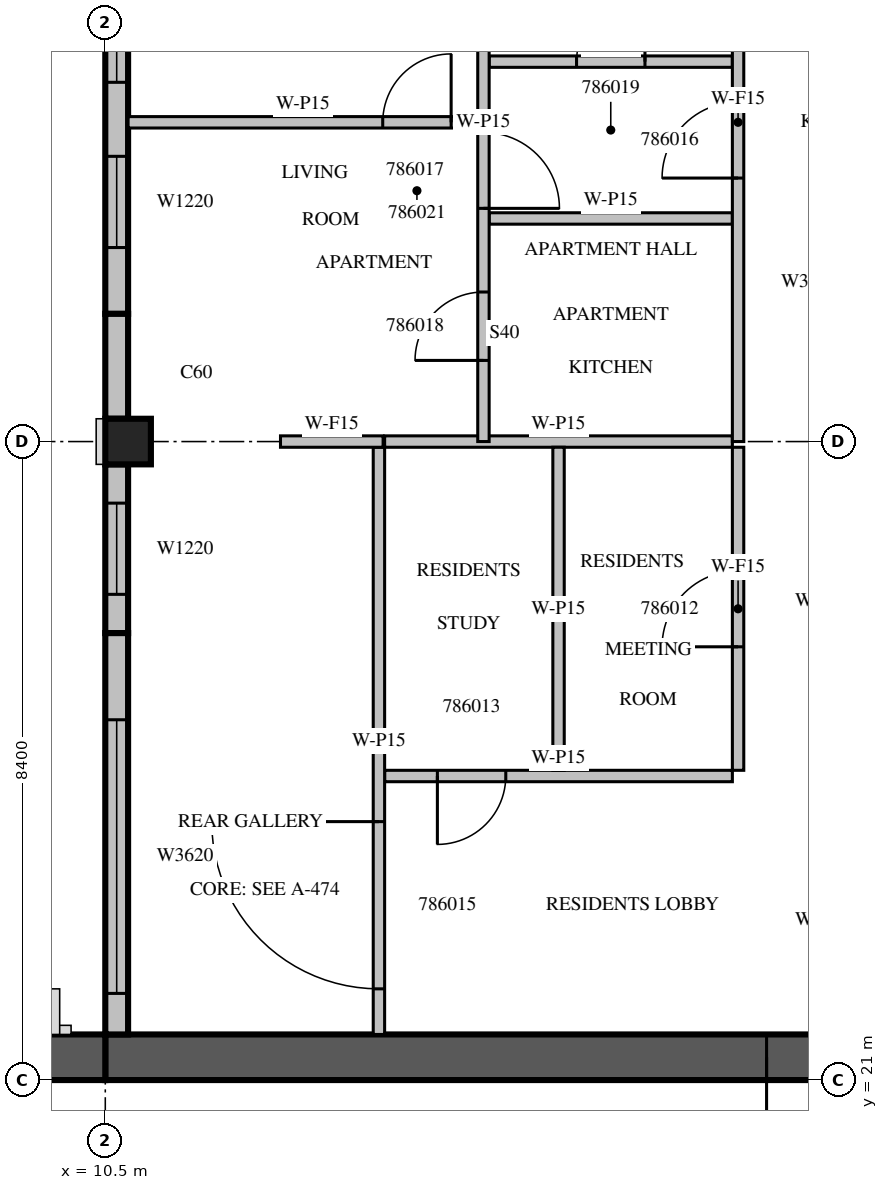
"""IFC4 building model, lengths in metres.
Left out: names, types, materials, properties, quantities, classifications, styles, units other than length and angle.
Written with IfcOpenShell. Run it as: python <this file> out.ifc"""

import sys

from ifc_helpers import new_model, si_unit, direction, frame, frame_2d, origin, origin_2d, place, context, subcontext, project, spatial, rectangle, extrude, source, transform, mapped, element, fill, save


model = new_model("IFC4")
c1 = context("Model", 3, precision=1e-05, world=origin(), true_north=direction((0.0, 1.0)))
c2 = subcontext(c1, "Body", "Model", "MODEL_VIEW")
j1 = project(units=[si_unit("LENGTHUNIT", "METRE"), si_unit("PLANEANGLEUNIT", "RADIAN")], contexts=[c1])
p1 = place(None, origin())
s1 = spatial("IfcSite", under=j1, at=p1, CompositionType="ELEMENT")
p2 = place(p1, origin())
s2 = spatial("IfcBuilding", under=s1, at=p2, CompositionType="ELEMENT")
p3 = place(p2, frame((0.0, 0.0, 361.5)))
s3 = spatial("IfcBuildingStorey", under=s2, at=p3, CompositionType="ELEMENT", Elevation=361.5)
m1 = source(origin(), c2, "Body", "SweptSolid", [
    extrude(rectangle(XDim=0.6, YDim=0.6, at=origin_2d()), origin(), (0.0, 0.0, 1.0), 3.5),
])
p4 = place(p3, frame((10.8, 29.4, 0.0), z_axis=(0.0, 0.0, 1.0), x_axis=(1.0, 0.0, 0.0)))
e1 = element("IfcColumn", 1, at=p4, inside=s3, PredefinedType="COLUMN", context=c2, shape_type="MappedRepresentation", body=[
    mapped(m1, transform((0.0, 0.0, 0.0), scale=1.0)),
])
m2 = source(origin(), c2, "Body", "SweptSolid", [
    extrude(rectangle(XDim=11.1, YDim=0.6, at=frame_2d((5.55, 0.0))), origin(), (0.0, 0.0, 1.0), 3.5),
])
p5 = place(p3, frame((10.5, 21.3, 0.0), z_axis=(0.0, 0.0, 1.0), x_axis=(1.0, 0.0, 0.0)))
e2 = element("IfcWall", 2, at=p5, inside=s3, PredefinedType="SHEAR", context=c2, shape_type="MappedRepresentation", body=[
    mapped(m2, transform((0.0, 0.0, 0.0), scale=1.0)),
])
m3 = source(origin(), c2, "Body", "SweptSolid", [
    extrude(rectangle(XDim=1.2, YDim=2.1, at=frame_2d((0.6, 1.05))), frame((0.0, 0.31, 0.0), z_axis=(0.0, -1.0, 0.0), x_axis=(1.0, 0.0, 0.0)), (0.0, 0.0, 1.0), 0.62),
])
p6 = place(p5, frame((8.7, 0.0, 0.0)))
e3 = element("IfcOpeningElement", 3, at=p6, cuts=e2, PredefinedType="OPENING", context=c2, shape_type="MappedRepresentation", body=[
    mapped(m3, transform((0.0, 0.0, 0.0), scale=1.0)),
])
m4 = source(origin(), c2, "Body", "SweptSolid", [
    extrude(rectangle(XDim=6.6, YDim=0.6, at=frame_2d((3.3, 0.0))), origin(), (0.0, 0.0, 1.0), 3.5),
])
p7 = place(p3, frame((3.9, 21.3, 0.0), z_axis=(0.0, 0.0, 1.0), x_axis=(1.0, 0.0, 0.0)))
e4 = element("IfcWall", 4, at=p7, inside=s3, PredefinedType="SHEAR", context=c2, shape_type="MappedRepresentation", body=[
    mapped(m4, transform((0.0, 0.0, 0.0), scale=1.0)),
])
m5 = source(origin(), c2, "Body", "SweptSolid", [
    extrude(rectangle(XDim=1.2, YDim=2.4, at=frame_2d((0.6, 1.2))), frame((0.0, 0.31, 0.0), z_axis=(0.0, -1.0, 0.0), x_axis=(1.0, 0.0, 0.0)), (0.0, 0.0, 1.0), 0.62),
])
p8 = place(p7, frame((1.5, 0.0, 0.6)))
e5 = element("IfcOpeningElement", 5, at=p8, cuts=e4, PredefinedType="OPENING", context=c2, shape_type="MappedRepresentation", body=[
    mapped(m5, transform((0.0, 0.0, 0.0), scale=1.0)),
])
p9 = place(p7, frame((3.6, 0.0, 0.6)))
e6 = element("IfcOpeningElement", 6, at=p9, cuts=e4, PredefinedType="OPENING", context=c2, shape_type="MappedRepresentation", body=[
    mapped(m5, transform((0.0, 0.0, 0.0), scale=1.0)),
])
m6 = source(origin(), c2, "Body", "SweptSolid", [
    extrude(rectangle(XDim=6.42, YDim=0.3, at=frame_2d((3.21, 0.0))), origin(), (0.0, 0.0, 1.0), 3.1),
])
p10 = place(p3, frame((10.65, 37.5, 0.0), z_axis=(0.0, 0.0, 1.0), x_axis=(0.0, -1.0, 0.0)))
e7 = element("IfcWall", 7, at=p10, inside=s3, PredefinedType="STANDARD", context=c2, shape_type="MappedRepresentation", body=[
    mapped(m6, transform((0.0, 0.0, 0.0), scale=1.0)),
])
m7 = source(origin(), c2, "Body", "SweptSolid", [
    extrude(rectangle(XDim=1.2, YDim=2.0, at=frame_2d((0.6, 1.0))), frame((0.0, 0.16, 0.0), z_axis=(0.0, -1.0, 0.0), x_axis=(1.0, 0.0, 0.0)), (0.0, 0.0, 1.0), 0.32),
])
p11 = place(p10, frame((4.348, 0.0, 0.6)))
e8 = element("IfcOpeningElement", 8, at=p11, cuts=e7, PredefinedType="OPENING", context=c2, shape_type="MappedRepresentation", body=[
    mapped(m7, transform((0.0, 0.0, 0.0), scale=1.0)),
])
m8 = source(origin(), c2, "Body", "SweptSolid", [
    extrude(rectangle(XDim=2.4, YDim=2.0, at=frame_2d((1.2, 1.0))), frame((0.0, 0.16, 0.0), z_axis=(0.0, -1.0, 0.0), x_axis=(1.0, 0.0, 0.0)), (0.0, 0.0, 1.0), 0.32),
])
p12 = place(p10, frame((0.974, 0.0, 0.6)))
e9 = element("IfcOpeningElement", 9, at=p12, cuts=e7, PredefinedType="OPENING", context=c2, shape_type="MappedRepresentation", body=[
    mapped(m8, transform((0.0, 0.0, 0.0), scale=1.0)),
])
m9 = source(origin(), c2, "Body", "SweptSolid", [
    extrude(rectangle(XDim=1.38, YDim=0.3, at=frame_2d((0.69, 0.0))), origin(), (0.0, 0.0, 1.0), 3.1),
])
p13 = place(p3, frame((10.65, 31.08, 0.0), z_axis=(0.0, 0.0, 1.0), x_axis=(0.0, -1.0, 0.0)))
e10 = element("IfcWall", 10, at=p13, inside=s3, PredefinedType="STANDARD", context=c2, shape_type="MappedRepresentation", body=[
    mapped(m9, transform((0.0, 0.0, 0.0), scale=1.0)),
])
m10 = source(origin(), c2, "Body", "SweptSolid", [
    extrude(rectangle(XDim=2.22, YDim=0.3, at=frame_2d((1.11, 0.0))), origin(), (0.0, 0.0, 1.0), 3.1),
])
p14 = place(p3, frame((10.65, 29.1, 0.0), z_axis=(0.0, 0.0, 1.0), x_axis=(0.0, -1.0, 0.0)))
e11 = element("IfcWall", 11, at=p14, inside=s3, PredefinedType="STANDARD", context=c2, shape_type="MappedRepresentation", body=[
    mapped(m10, transform((0.0, 0.0, 0.0), scale=1.0)),
])
p15 = place(p14, frame((0.51, 0.0, 0.6)))
e12 = element("IfcOpeningElement", 12, at=p15, cuts=e11, PredefinedType="OPENING", context=c2, shape_type="MappedRepresentation", body=[
    mapped(m7, transform((0.0, 0.0, 0.0), scale=1.0)),
])
m11 = source(origin(), c2, "Body", "SweptSolid", [
    extrude(rectangle(XDim=5.28, YDim=0.3, at=frame_2d((2.64, 0.0))), origin(), (0.0, 0.0, 1.0), 3.1),
])
p16 = place(p3, frame((10.65, 26.88, 0.0), z_axis=(0.0, 0.0, 1.0), x_axis=(0.0, -1.0, 0.0)))
e13 = element("IfcWall", 13, at=p16, inside=s3, PredefinedType="STANDARD", context=c2, shape_type="MappedRepresentation", body=[
    mapped(m11, transform((0.0, 0.0, 0.0), scale=1.0)),
])
m12 = source(origin(), c2, "Body", "SweptSolid", [
    extrude(rectangle(XDim=3.6, YDim=2.0, at=frame_2d((1.8, 1.0))), frame((0.0, 0.16, 0.0), z_axis=(0.0, -1.0, 0.0), x_axis=(1.0, 0.0, 0.0)), (0.0, 0.0, 1.0), 0.32),
])
p17 = place(p16, frame((1.14, 0.0, 0.6)))
e14 = element("IfcOpeningElement", 14, at=p17, cuts=e13, PredefinedType="OPENING", context=c2, shape_type="MappedRepresentation", body=[
    mapped(m12, transform((0.0, 0.0, 0.0), scale=1.0)),
])
m13 = source(origin(), c2, "Body", "SweptSolid", [
    extrude(rectangle(XDim=4.575, YDim=0.15, at=frame_2d((2.288, 0.0))), origin(), (0.0, 0.0, 1.0), 3.1),
])
p18 = place(p3, frame((14.175, 25.0, 0.0), z_axis=(0.0, 0.0, 1.0), x_axis=(1.0, 0.0, 0.0)))
e15 = element("IfcWall", 15, at=p18, inside=s3, PredefinedType="PARTITIONING", context=c2, shape_type="MappedRepresentation", body=[
    mapped(m13, transform((0.0, 0.0, 0.0), scale=1.0)),
])
m14 = source(origin(), c2, "Body", "SweptSolid", [
    extrude(rectangle(XDim=0.9, YDim=2.1, at=frame_2d((0.45, 1.05))), frame((0.0, 0.085, 0.0), z_axis=(0.0, -1.0, 0.0), x_axis=(1.0, 0.0, 0.0)), (0.0, 0.0, 1.0), 0.17),
])
p19 = place(p18, frame((0.694, 0.0, 0.0)))
e16 = element("IfcOpeningElement", 16, at=p19, cuts=e15, PredefinedType="OPENING", context=c2, shape_type="MappedRepresentation", body=[
    mapped(m14, transform((0.0, 0.0, 0.0), scale=1.0)),
])
p20 = place(p3, frame((18.75, 29.4, 0.0), z_axis=(0.0, 0.0, 1.0), x_axis=(-1.0, 0.0, 0.0)))
e17 = element("IfcWall", 17, at=p20, inside=s3, PredefinedType="PARTITIONING", context=c2, shape_type="MappedRepresentation", body=[
    mapped(m13, transform((0.0, 0.0, 0.0), scale=1.0)),
])
m15 = source(origin(), c2, "Body", "SweptSolid", [
    extrude(rectangle(XDim=4.25, YDim=0.15, at=frame_2d((2.125, 0.0))), origin(), (0.0, 0.0, 1.0), 3.1),
])
p21 = place(p3, frame((18.825, 25.075, 0.0), z_axis=(0.0, 0.0, 1.0), x_axis=(0.0, 1.0, 0.0)))
e18 = element("IfcWall", 18, at=p21, inside=s3, PredefinedType="PARTITIONING", context=c2, shape_type="MappedRepresentation", body=[
    mapped(m15, transform((0.0, 0.0, 0.0), scale=1.0)),
])
m16 = source(origin(), c2, "Body", "SweptSolid", [
    extrude(rectangle(XDim=1.0, YDim=2.1, at=frame_2d((0.5, 1.05))), frame((0.0, 0.085, 0.0), z_axis=(0.0, -1.0, 0.0), x_axis=(1.0, 0.0, 0.0)), (0.0, 0.0, 1.0), 0.17),
])
p22 = place(p21, frame((1.625, 0.0, 0.0)))
e19 = element("IfcOpeningElement", 19, at=p22, cuts=e18, PredefinedType="OPENING", context=c2, shape_type="MappedRepresentation", body=[
    mapped(m16, transform((0.0, 0.0, 0.0), scale=1.0)),
])
p23 = place(p3, frame((16.463, 25.075, 0.0), z_axis=(0.0, 0.0, 1.0), x_axis=(0.0, 1.0, 0.0)))
e20 = element("IfcWall", 20, at=p23, inside=s3, PredefinedType="PARTITIONING", context=c2, shape_type="MappedRepresentation", body=[
    mapped(m15, transform((0.0, 0.0, 0.0), scale=1.0)),
])
m17 = source(origin(), c2, "Body", "SweptSolid", [
    extrude(rectangle(XDim=7.725, YDim=0.15, at=frame_2d((3.862, 0.0))), origin(), (0.0, 0.0, 1.0), 3.1),
])
p24 = place(p3, frame((14.1, 29.325, 0.0), z_axis=(0.0, 0.0, 1.0), x_axis=(0.0, -1.0, 0.0)))
e21 = element("IfcWall", 21, at=p24, inside=s3, PredefinedType="PARTITIONING", context=c2, shape_type="MappedRepresentation", body=[
    mapped(m17, transform((0.0, 0.0, 0.0), scale=1.0)),
])
m18 = source(origin(), c2, "Body", "SweptSolid", [
    extrude(rectangle(XDim=2.2, YDim=2.1, at=frame_2d((1.1, 1.05))), frame((0.0, 0.085, 0.0), z_axis=(0.0, -1.0, 0.0), x_axis=(1.0, 0.0, 0.0)), (0.0, 0.0, 1.0), 0.17),
])
p25 = place(p24, frame((4.925, 0.0, 0.0)))
e22 = element("IfcOpeningElement", 22, at=p25, cuts=e21, PredefinedType="OPENING", context=c2, shape_type="MappedRepresentation", body=[
    mapped(m18, transform((0.0, 0.0, 0.0), scale=1.0)),
])
m19 = source(origin(), c2, "Body", "SweptSolid", [
    extrude(rectangle(XDim=4.6, YDim=0.15, at=frame_2d((2.3, 0.0))), origin(), (0.0, 0.0, 1.0), 3.1),
])
p26 = place(p3, frame((15.4, 33.6, 0.0), z_axis=(0.0, 0.0, 1.0), x_axis=(-1.0, 0.0, 0.0)))
e23 = element("IfcWall", 23, at=p26, inside=s3, PredefinedType="PARTITIONING", context=c2, shape_type="MappedRepresentation", body=[
    mapped(m19, transform((0.0, 0.0, 0.0), scale=1.0)),
])
p27 = place(p26, frame((0.35, 0.0, 0.0)))
e24 = element("IfcOpeningElement", 24, at=p27, cuts=e23, PredefinedType="OPENING", context=c2, shape_type="MappedRepresentation", body=[
    mapped(m14, transform((0.0, 0.0, 0.0), scale=1.0)),
])
m20 = source(origin(), c2, "Body", "SweptSolid", [
    extrude(rectangle(XDim=3.2, YDim=0.15, at=frame_2d((1.6, 0.0))), origin(), (0.0, 0.0, 1.0), 3.1),
])
p28 = place(p3, frame((18.75, 32.335, 0.0), z_axis=(0.0, 0.0, 1.0), x_axis=(-1.0, 0.0, 0.0)))
e25 = element("IfcWall", 25, at=p28, inside=s3, PredefinedType="PARTITIONING", context=c2, shape_type="MappedRepresentation", body=[
    mapped(m20, transform((0.0, 0.0, 0.0), scale=1.0)),
])
p29 = place(p3, frame((18.75, 34.398, 0.0), z_axis=(0.0, 0.0, 1.0), x_axis=(-1.0, 0.0, 0.0)))
e26 = element("IfcWall", 26, at=p29, inside=s3, PredefinedType="PARTITIONING", context=c2, shape_type="MappedRepresentation", body=[
    mapped(m20, transform((0.0, 0.0, 0.0), scale=1.0)),
])
p30 = place(p29, frame((1.15, 0.0, 0.0)))
e27 = element("IfcOpeningElement", 27, at=p30, cuts=e26, PredefinedType="OPENING", context=c2, shape_type="MappedRepresentation", body=[
    mapped(m14, transform((0.0, 0.0, 0.0), scale=1.0)),
])
m21 = source(origin(), c2, "Body", "SweptSolid", [
    extrude(rectangle(XDim=1.35, YDim=0.15, at=frame_2d((0.675, 0.0))), origin(), (0.0, 0.0, 1.0), 3.1),
])
p31 = place(p3, frame((14.155, 29.4, 0.0), z_axis=(0.0, 0.0, 1.0), x_axis=(-1.0, 0.0, 0.0)))
e28 = element("IfcWall", 28, at=p31, inside=s3, PredefinedType="PARTITIONING", context=c2, shape_type="MappedRepresentation", body=[
    mapped(m21, transform((0.0, 0.0, 0.0), scale=1.0)),
])
m22 = source(origin(), c2, "Body", "SweptSolid", [
    extrude(rectangle(XDim=8.4, YDim=0.15, at=frame_2d((4.2, 0.0))), origin(), (0.0, 0.0, 1.0), 3.1),
])
p32 = place(p3, frame((15.475, 29.4, 0.0), z_axis=(0.0, 0.0, 1.0), x_axis=(0.0, 1.0, 0.0)))
e29 = element("IfcWall", 29, at=p32, inside=s3, PredefinedType="PARTITIONING", context=c2, shape_type="MappedRepresentation", body=[
    mapped(m22, transform((0.0, 0.0, 0.0), scale=1.0)),
])
p33 = place(p32, frame((3.068, 0.0, 0.0)))
e30 = element("IfcOpeningElement", 30, at=p33, cuts=e29, PredefinedType="OPENING", context=c2, shape_type="MappedRepresentation", body=[
    mapped(m16, transform((0.0, 0.0, 0.0), scale=1.0)),
])
p34 = place(p32, frame((1.067, 0.0, 0.0)))
e31 = element("IfcOpeningElement", 31, at=p34, cuts=e29, PredefinedType="OPENING", context=c2, shape_type="MappedRepresentation", body=[
    mapped(m14, transform((0.0, 0.0, 0.0), scale=1.0)),
])
p35 = place(p32, frame((7.252, 0.0, 0.0)))
e32 = element("IfcOpeningElement", 32, at=p35, cuts=e29, PredefinedType="OPENING", context=c2, shape_type="MappedRepresentation", body=[
    mapped(m14, transform((0.0, 0.0, 0.0), scale=1.0)),
])
p36 = place(p3, frame((18.825, 29.4, 0.0), z_axis=(0.0, 0.0, 1.0), x_axis=(0.0, 1.0, 0.0)))
e33 = element("IfcWall", 33, at=p36, inside=s3, PredefinedType="PARTITIONING", context=c2, shape_type="MappedRepresentation", body=[
    mapped(m22, transform((0.0, 0.0, 0.0), scale=1.0)),
])
p37 = place(p36, frame((3.467, 0.0, 0.0)))
e34 = element("IfcOpeningElement", 34, at=p37, cuts=e33, PredefinedType="OPENING", context=c2, shape_type="MappedRepresentation", body=[
    mapped(m16, transform((0.0, 0.0, 0.0), scale=1.0)),
])
m23 = source(origin(), c2, "Body", "SweptSolid", [
    extrude(rectangle(XDim=1.2, YDim=2.0, at=frame_2d((0.6, 1.0))), frame((0.0, 0.03, 0.0), z_axis=(0.0, -1.0, 0.0), x_axis=(1.0, 0.0, 0.0)), (0.0, 0.0, 1.0), 0.06),
])
p38 = place(p11, origin())
e35 = element("IfcWindow", 35, at=p38, inside=s3, PartitioningType="SINGLE_PANEL", PredefinedType="WINDOW", context=c2, shape_type="MappedRepresentation", body=[
    mapped(m23, transform((0.0, 0.0, 0.0), scale=1.0)),
])
fill(e8, e35)
m24 = source(origin(), c2, "Body", "SweptSolid", [
    extrude(rectangle(XDim=2.4, YDim=2.0, at=frame_2d((1.2, 1.0))), frame((0.0, 0.03, 0.0), z_axis=(0.0, -1.0, 0.0), x_axis=(1.0, 0.0, 0.0)), (0.0, 0.0, 1.0), 0.06),
])
p39 = place(p12, origin())
e36 = element("IfcWindow", 36, at=p39, inside=s3, PartitioningType="SINGLE_PANEL", PredefinedType="WINDOW", context=c2, shape_type="MappedRepresentation", body=[
    mapped(m24, transform((0.0, 0.0, 0.0), scale=1.0)),
])
fill(e9, e36)
p40 = place(p15, origin())
e37 = element("IfcWindow", 37, at=p40, inside=s3, PartitioningType="SINGLE_PANEL", PredefinedType="WINDOW", context=c2, shape_type="MappedRepresentation", body=[
    mapped(m23, transform((0.0, 0.0, 0.0), scale=1.0)),
])
fill(e12, e37)
m25 = source(origin(), c2, "Body", "SweptSolid", [
    extrude(rectangle(XDim=3.6, YDim=2.0, at=frame_2d((1.8, 1.0))), frame((0.0, 0.03, 0.0), z_axis=(0.0, -1.0, 0.0), x_axis=(1.0, 0.0, 0.0)), (0.0, 0.0, 1.0), 0.06),
])
p41 = place(p17, origin())
e38 = element("IfcWindow", 38, at=p41, inside=s3, PartitioningType="SINGLE_PANEL", PredefinedType="WINDOW", context=c2, shape_type="MappedRepresentation", body=[
    mapped(m25, transform((0.0, 0.0, 0.0), scale=1.0)),
])
fill(e14, e38)
m26 = source(origin(), c2, "Body", "SweptSolid", [
    extrude(rectangle(XDim=1.2, YDim=2.1, at=frame_2d((0.6, 1.05))), frame((0.0, 0.025, 0.0), z_axis=(0.0, -1.0, 0.0), x_axis=(1.0, 0.0, 0.0)), (0.0, 0.0, 1.0), 0.05),
])
p42 = place(p6, origin())
e39 = element("IfcDoor", 39, at=p42, inside=s3, OperationType="SINGLE_SWING_RIGHT", PredefinedType="DOOR", context=c2, shape_type="MappedRepresentation", body=[
    mapped(m26, transform((0.0, 0.0, 0.0), scale=1.0)),
])
fill(e3, e39)
m27 = source(origin(), c2, "Body", "SweptSolid", [
    extrude(rectangle(XDim=1.0, YDim=2.1, at=frame_2d((0.5, 1.05))), frame((0.0, 0.025, 0.0), z_axis=(0.0, -1.0, 0.0), x_axis=(1.0, 0.0, 0.0)), (0.0, 0.0, 1.0), 0.05),
])
p43 = place(p22, origin())
e40 = element("IfcDoor", 40, at=p43, inside=s3, OperationType="SINGLE_SWING_LEFT", PredefinedType="DOOR", context=c2, shape_type="MappedRepresentation", body=[
    mapped(m27, transform((0.0, 0.0, 0.0), scale=1.0)),
])
fill(e19, e40)
m28 = source(origin(), c2, "Body", "SweptSolid", [
    extrude(rectangle(XDim=0.9, YDim=2.1, at=frame_2d((0.45, 1.05))), frame((0.0, 0.025, 0.0), z_axis=(0.0, -1.0, 0.0), x_axis=(1.0, 0.0, 0.0)), (0.0, 0.0, 1.0), 0.05),
])
p44 = place(p19, origin())
e41 = element("IfcDoor", 41, at=p44, inside=s3, OperationType="SINGLE_SWING_RIGHT", PredefinedType="DOOR", context=c2, shape_type="MappedRepresentation", body=[
    mapped(m28, transform((0.0, 0.0, 0.0), scale=1.0)),
])
fill(e16, e41)
m29 = source(origin(), c2, "Body", "SweptSolid", [
    extrude(rectangle(XDim=2.2, YDim=2.1, at=frame_2d((1.1, 1.05))), frame((0.0, 0.025, 0.0), z_axis=(0.0, -1.0, 0.0), x_axis=(1.0, 0.0, 0.0)), (0.0, 0.0, 1.0), 0.05),
])
p45 = place(p25, origin())
e42 = element("IfcDoor", 42, at=p45, inside=s3, OperationType="DOUBLE_DOOR_SINGLE_SWING", PredefinedType="DOOR", context=c2, shape_type="MappedRepresentation", body=[
    mapped(m29, transform((0.0, 0.0, 0.0), scale=1.0)),
])
fill(e22, e42)
p46 = place(p37, origin())
e43 = element("IfcDoor", 43, at=p46, inside=s3, OperationType="SINGLE_SWING_LEFT", PredefinedType="DOOR", context=c2, shape_type="MappedRepresentation", body=[
    mapped(m27, transform((0.0, 0.0, 0.0), scale=1.0)),
])
fill(e34, e43)
p47 = place(p33, origin())
e44 = element("IfcDoor", 44, at=p47, inside=s3, OperationType="SINGLE_SWING_RIGHT", PredefinedType="DOOR", context=c2, shape_type="MappedRepresentation", body=[
    mapped(m27, transform((0.0, 0.0, 0.0), scale=1.0)),
])
fill(e30, e44)
p48 = place(p34, origin())
e45 = element("IfcDoor", 45, at=p48, inside=s3, OperationType="SINGLE_SWING_LEFT", PredefinedType="DOOR", context=c2, shape_type="MappedRepresentation", body=[
    mapped(m28, transform((0.0, 0.0, 0.0), scale=1.0)),
])
fill(e31, e45)
p49 = place(p30, origin())
e46 = element("IfcDoor", 46, at=p49, inside=s3, OperationType="SINGLE_SWING_RIGHT", PredefinedType="DOOR", context=c2, shape_type="MappedRepresentation", body=[
    mapped(m28, transform((0.0, 0.0, 0.0), scale=1.0)),
])
fill(e27, e46)
p50 = place(p27, origin())
e47 = element("IfcDoor", 47, at=p50, inside=s3, OperationType="SINGLE_SWING_RIGHT", PredefinedType="DOOR", context=c2, shape_type="MappedRepresentation", body=[
    mapped(m28, transform((0.0, 0.0, 0.0), scale=1.0)),
])
fill(e24, e47)
save(model, sys.argv[1])
